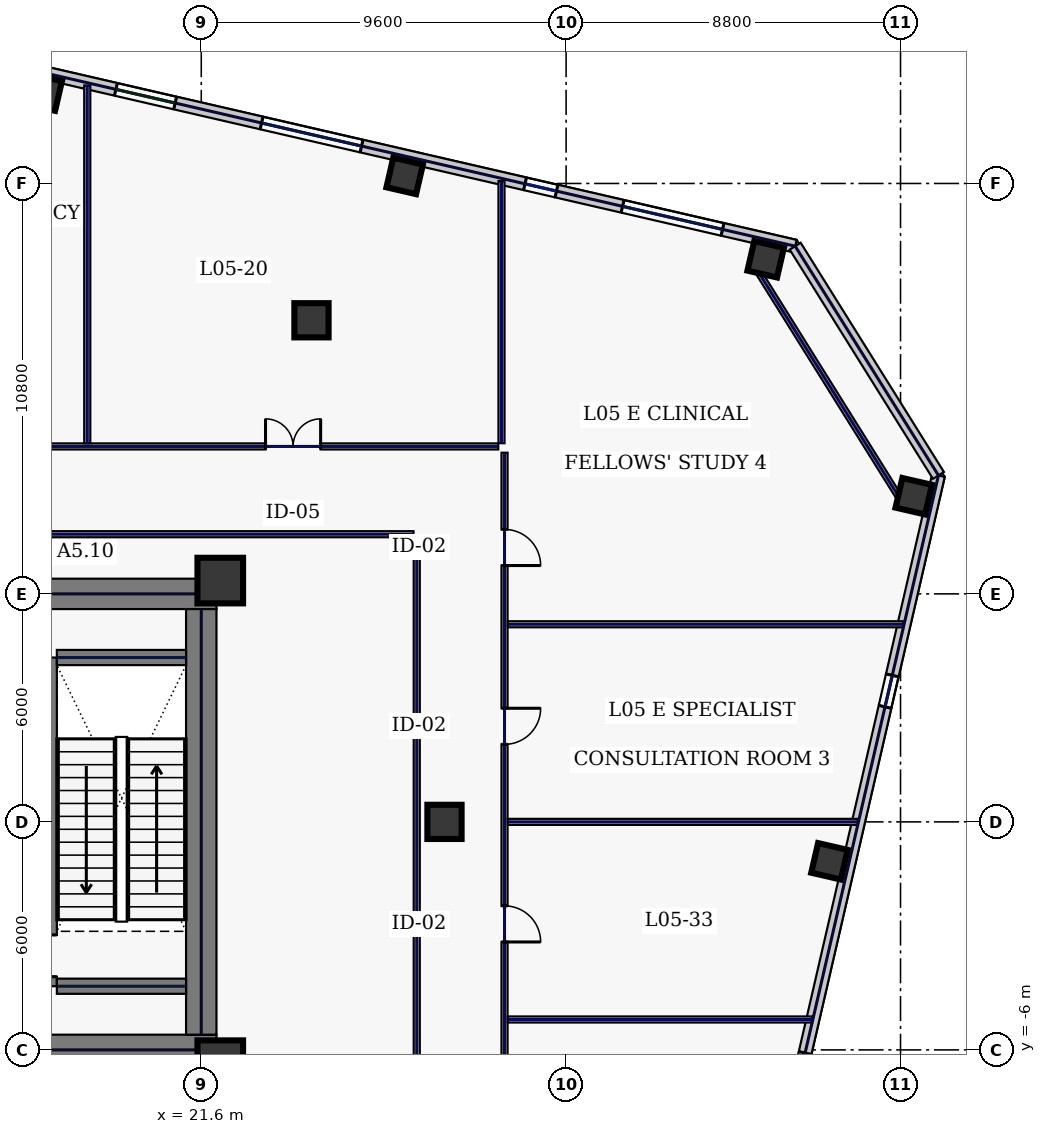
"""IFC4 building model, lengths in metres.
Left out: names, types, materials, properties, quantities, classifications, styles, units other than length and angle.
Written with IfcOpenShell. Run it as: python <this file> out.ifc"""

import sys

from ifc_helpers import new_model, si_unit, direction, frame, frame_2d, origin, origin_2d, place, context, subcontext, project, spatial, rectangle, hollow_rectangle, extrude, element, fill, save


model = new_model("IFC4")
c1 = context("Model", 3, precision=1e-05, world=origin(), true_north=direction((0.0, 1.0)))
c2 = subcontext(c1, "Body", "Model", "MODEL_VIEW")
j1 = project(units=[si_unit("LENGTHUNIT", "METRE"), si_unit("PLANEANGLEUNIT", "RADIAN")], contexts=[c1])
p1 = place(None, origin())
s1 = spatial("IfcSite", under=j1, at=p1, CompositionType="ELEMENT")
p2 = place(p1, origin())
s2 = spatial("IfcBuilding", under=s1, at=p2, CompositionType="ELEMENT")
p3 = place(p2, frame((0.0, 0.0, 28.4)))
s3 = spatial("IfcBuildingStorey", under=s2, at=p3, CompositionType="ELEMENT", Elevation=28.4)
for number, where, z_axis, x_axis in (
    (1, (10.4, 6.0, 0.0), (0.0, 0.0, 1.0), (1.0, 0.0, 0.0)),
    (2, (10.4, -6.0, 0.0), (0.0, 0.0, 1.0), (1.0, 0.0, 0.0)),
):
    element("IfcWall", number, at=place(p3, frame(where, z_axis=z_axis, x_axis=x_axis)), inside=s3, PredefinedType="SHEAR", context=c2, shape_type="SweptSolid", body=[
        extrude(rectangle(XDim=11.6, YDim=0.8, at=frame_2d((5.8, 0.0))), origin(), (0.0, 0.0, 1.0), 4.68),
    ])
p4 = place(p3, frame((21.6, -5.6, 0.0), z_axis=(0.0, 0.0, 1.0), x_axis=(0.0, 1.0, 0.0)))
e3 = element("IfcWall", 3, at=p4, inside=s3, PredefinedType="SHEAR", context=c2, shape_type="SweptSolid", body=[
    extrude(rectangle(XDim=11.2, YDim=0.8, at=frame_2d((5.6, 0.0))), origin(), (0.0, 0.0, 1.0), 4.68),
])
p5 = place(p3, frame((17.6, -4.325, 0.0), z_axis=(0.0, 0.0, 1.0), x_axis=(0.0, 1.0, 0.0)))
e4 = element("IfcWall", 4, at=p5, inside=s3, PredefinedType="SHEAR", context=c2, shape_type="SweptSolid", body=[
    extrude(rectangle(XDim=8.65, YDim=0.4, at=frame_2d((4.325, 0.0))), origin(), (0.0, 0.0, 1.0), 4.68),
])
p6 = place(p5, frame((0.25, 0.0, 0.0)))
e5 = element("IfcOpeningElement", 5, at=p6, cuts=e4, PredefinedType="OPENING", context=c2, shape_type="SweptSolid", body=[
    extrude(rectangle(XDim=1.1, YDim=2.2, at=frame_2d((0.55, 1.1))), frame((0.0, 0.21, 0.0), z_axis=(0.0, -1.0, 0.0), x_axis=(1.0, 0.0, 0.0)), (0.0, 0.0, 1.0), 0.42),
])
for number, where, z_axis, x_axis in (
    (6, (17.8, -4.325, 0.0), (0.0, 0.0, 1.0), (1.0, 0.0, 0.0)),
    (7, (17.8, 4.325, 0.0), (0.0, 0.0, 1.0), (1.0, 0.0, 0.0)),
):
    element("IfcWall", number, at=place(p3, frame(where, z_axis=z_axis, x_axis=x_axis)), inside=s3, PredefinedType="SHEAR", context=c2, shape_type="SweptSolid", body=[
        extrude(rectangle(XDim=3.4, YDim=0.4, at=frame_2d((1.7, 0.0))), origin(), (0.0, 0.0, 1.0), 4.68),
    ])
for number, where, z_axis, x_axis in (
    (8, (22.1, -6.35, 0.0), (0.0, 0.0, 1.0), (1.0, 0.0, 0.0)),
    (9, (22.1, 6.35, 0.0), (0.0, 0.0, 1.0), (1.0, 0.0, 0.0)),
):
    element("IfcColumn", number, at=place(p3, frame(where, z_axis=z_axis, x_axis=x_axis)), inside=s3, PredefinedType="COLUMN", context=c2, shape_type="SweptSolid", body=[
        extrude(hollow_rectangle(XDim=1.2, YDim=1.2, WallThickness=0.05, at=origin_2d()), origin(), (0.0, 0.0, 1.0), 4.68),
    ])
for number, where, z_axis, x_axis in (
    (10, (24.5, 13.2, 0.0), (0.0, 0.0, 1.0), (1.0, 0.0, 0.0)),
    (11, (28.0, 0.0, 0.0), (0.0, 0.0, 1.0), (1.0, 0.0, 0.0)),
):
    element("IfcColumn", number, at=place(p3, frame(where, z_axis=z_axis, x_axis=x_axis)), inside=s3, PredefinedType="COLUMN", context=c2, shape_type="SweptSolid", body=[
        extrude(hollow_rectangle(XDim=0.9, YDim=0.9, WallThickness=0.04, at=origin_2d()), origin(), (0.0, 0.0, 1.0), 4.68),
    ])
for number, where, z_axis, x_axis in (
    (12, (36.451, 14.806, 0.0), (0.0, 0.0, 1.0), (0.974, -0.225, 0.0)),
    (13, (26.952, 16.999, 0.0), (0.0, 0.0, 1.0), (0.974, -0.225, 0.0)),
    (14, (17.454, 19.192, 0.0), (0.0, 0.0, 1.0), (0.974, -0.225, 0.0)),
    (15, (38.13, -1.038, 0.0), (0.0, 0.0, 1.0), (0.974, -0.225, 0.0)),
    (16, (40.348, 8.57, 0.0), (0.0, 0.0, 1.0), (0.974, -0.225, 0.0)),
):
    element("IfcColumn", number, at=place(p3, frame(where, z_axis=z_axis, x_axis=x_axis)), inside=s3, PredefinedType="COLUMN", context=c2, shape_type="SweptSolid", body=[
        extrude(hollow_rectangle(XDim=0.8, YDim=0.8, WallThickness=0.036, at=origin_2d()), origin(), (0.0, 0.0, 1.0), 4.68),
    ])
p7 = place(p3, frame((37.229, 15.15, 0.0), z_axis=(0.0, 0.0, 1.0), x_axis=(-0.97436993772, 0.224951604723, 0.0)))
e17 = element("IfcWall", 17, at=p7, inside=s3, PredefinedType="STANDARD", context=c2, shape_type="SweptSolid", body=[
    extrude(rectangle(XDim=22.651, YDim=0.34, at=frame_2d((11.326, 0.0))), origin(), (0.0, 0.0, 1.0), 4.68),
])
p8 = place(p7, frame((16.745, 0.0, 0.22)))
e18 = element("IfcOpeningElement", 18, at=p8, cuts=e17, PredefinedType="OPENING", context=c2, shape_type="SweptSolid", body=[
    extrude(rectangle(XDim=1.6, YDim=1.2, at=frame_2d((0.8, 0.6))), frame((0.0, 0.18, 0.0), z_axis=(0.0, -1.0, 0.0), x_axis=(1.0, 0.0, 0.0)), (0.0, 0.0, 1.0), 0.36),
])
p9 = place(p7, frame((11.711, 0.0, 0.9)))
e19 = element("IfcOpeningElement", 19, at=p9, cuts=e17, PredefinedType="OPENING", context=c2, shape_type="SweptSolid", body=[
    extrude(rectangle(XDim=2.7, YDim=2.2, at=frame_2d((1.35, 1.1))), frame((0.0, 0.18, 0.0), z_axis=(0.0, -1.0, 0.0), x_axis=(1.0, 0.0, 0.0)), (0.0, 0.0, 1.0), 0.36),
])
p10 = place(p7, frame((6.447, 0.0, 0.9)))
e20 = element("IfcOpeningElement", 20, at=p10, cuts=e17, PredefinedType="OPENING", context=c2, shape_type="SweptSolid", body=[
    extrude(rectangle(XDim=0.85, YDim=1.85, at=frame_2d((0.425, 0.925))), frame((0.0, 0.18, 0.0), z_axis=(0.0, -1.0, 0.0), x_axis=(1.0, 0.0, 0.0)), (0.0, 0.0, 1.0), 0.36),
])
p11 = place(p7, frame((1.962, 0.0, 0.9)))
e21 = element("IfcOpeningElement", 21, at=p11, cuts=e17, PredefinedType="OPENING", context=c2, shape_type="SweptSolid", body=[
    extrude(rectangle(XDim=2.7, YDim=2.2, at=frame_2d((1.35, 1.1))), frame((0.0, 0.18, 0.0), z_axis=(0.0, -1.0, 0.0), x_axis=(1.0, 0.0, 0.0)), (0.0, 0.0, 1.0), 0.36),
])
p12 = place(p3, frame((31.82, -30.637, 0.0), z_axis=(0.0, 0.0, 1.0), x_axis=(0.224949969076, 0.974370315338, 0.0)))
e22 = element("IfcWall", 22, at=p12, inside=s3, PredefinedType="STANDARD", context=c2, shape_type="SweptSolid", body=[
    extrude(rectangle(XDim=40.8, YDim=0.34, at=frame_2d((20.4, 0.0))), origin(), (0.0, 0.0, 1.0), 4.68),
])
p13 = place(p12, frame((4.3, 0.0, 0.58)))
e23 = element("IfcOpeningElement", 23, at=p13, cuts=e22, PredefinedType="OPENING", context=c2, shape_type="SweptSolid", body=[
    extrude(rectangle(XDim=1.6, YDim=2.3, at=frame_2d((0.8, 1.15))), frame((0.0, 0.18, 0.0), z_axis=(0.0, -1.0, 0.0), x_axis=(1.0, 0.0, 0.0)), (0.0, 0.0, 1.0), 0.36),
])
p14 = place(p12, frame((14.5, 0.0, 0.58)))
e24 = element("IfcOpeningElement", 24, at=p14, cuts=e22, PredefinedType="OPENING", context=c2, shape_type="SweptSolid", body=[
    extrude(rectangle(XDim=1.6, YDim=2.3, at=frame_2d((0.8, 1.15))), frame((0.0, 0.18, 0.0), z_axis=(0.0, -1.0, 0.0), x_axis=(1.0, 0.0, 0.0)), (0.0, 0.0, 1.0), 0.36),
])
p15 = place(p12, frame((24.35, 0.0, 0.75)))
e25 = element("IfcOpeningElement", 25, at=p15, cuts=e22, PredefinedType="OPENING", context=c2, shape_type="SweptSolid", body=[
    extrude(rectangle(XDim=0.85, YDim=1.85, at=frame_2d((0.425, 0.925))), frame((0.0, 0.18, 0.0), z_axis=(0.0, -1.0, 0.0), x_axis=(1.0, 0.0, 0.0)), (0.0, 0.0, 1.0), 0.36),
])
p16 = place(p12, frame((34.55, 0.0, 0.75)))
e26 = element("IfcOpeningElement", 26, at=p16, cuts=e22, PredefinedType="OPENING", context=c2, shape_type="SweptSolid", body=[
    extrude(rectangle(XDim=0.85, YDim=1.85, at=frame_2d((0.425, 0.925))), frame((0.0, 0.18, 0.0), z_axis=(0.0, -1.0, 0.0), x_axis=(1.0, 0.0, 0.0)), (0.0, 0.0, 1.0), 0.36),
])
p17 = place(p3, frame((40.998, 9.117, 0.0), z_axis=(0.0, 0.0, 1.0), x_axis=(-0.529921811158, 0.848046504656, 0.0)))
e27 = element("IfcWall", 27, at=p17, inside=s3, PredefinedType="STANDARD", context=c2, shape_type="SweptSolid", body=[
    extrude(rectangle(XDim=7.113, YDim=0.34, at=frame_2d((3.557, 0.0))), origin(), (0.0, 0.0, 1.0), 4.68),
])
p18 = place(p3, frame((40.06, 8.389, 0.0), z_axis=(0.0, 0.0, 1.0), x_axis=(-0.529927317139, 0.848043064089, 0.0)))
e28 = element("IfcWall", 28, at=p18, inside=s3, PredefinedType="PARTITIONING", context=c2, shape_type="SweptSolid", body=[
    extrude(rectangle(XDim=7.354, YDim=0.16, at=frame_2d((3.677, 0.0))), origin(), (0.0, 0.0, 1.0), 4.68),
])
p19 = place(p3, frame((-29.415, 9.88, 0.0), z_axis=(0.0, 0.0, 1.0), x_axis=(1.0, 0.0, 0.0)))
e29 = element("IfcWall", 29, at=p19, inside=s3, PredefinedType="PARTITIONING", context=c2, shape_type="SweptSolid", body=[
    extrude(rectangle(XDim=58.83, YDim=0.16, at=frame_2d((29.415, 0.0))), origin(), (0.0, 0.0, 1.0), 4.68),
])
p20 = place(p19, frame((2.469, 0.0, 0.0)))
e30 = element("IfcOpeningElement", 30, at=p20, cuts=e29, PredefinedType="OPENING", context=c2, shape_type="SweptSolid", body=[
    extrude(rectangle(XDim=0.95, YDim=2.2, at=frame_2d((0.475, 1.1))), frame((0.0, 0.09, 0.0), z_axis=(0.0, -1.0, 0.0), x_axis=(1.0, 0.0, 0.0)), (0.0, 0.0, 1.0), 0.18),
])
p21 = place(p19, frame((7.15, 0.0, 0.0)))
e31 = element("IfcOpeningElement", 31, at=p21, cuts=e29, PredefinedType="OPENING", context=c2, shape_type="SweptSolid", body=[
    extrude(rectangle(XDim=1.3, YDim=2.2, at=frame_2d((0.65, 1.1))), frame((0.0, 0.09, 0.0), z_axis=(0.0, -1.0, 0.0), x_axis=(1.0, 0.0, 0.0)), (0.0, 0.0, 1.0), 0.18),
])
p22 = place(p19, frame((14.325, 0.0, 0.0)))
e32 = element("IfcOpeningElement", 32, at=p22, cuts=e29, PredefinedType="OPENING", context=c2, shape_type="SweptSolid", body=[
    extrude(rectangle(XDim=1.3, YDim=2.2, at=frame_2d((0.65, 1.1))), frame((0.0, 0.09, 0.0), z_axis=(0.0, -1.0, 0.0), x_axis=(1.0, 0.0, 0.0)), (0.0, 0.0, 1.0), 0.18),
])
p23 = place(p19, frame((23.8, 0.0, 0.0)))
e33 = element("IfcOpeningElement", 33, at=p23, cuts=e29, PredefinedType="OPENING", context=c2, shape_type="SweptSolid", body=[
    extrude(rectangle(XDim=1.15, YDim=2.2, at=frame_2d((0.575, 1.1))), frame((0.0, 0.09, 0.0), z_axis=(0.0, -1.0, 0.0), x_axis=(1.0, 0.0, 0.0)), (0.0, 0.0, 1.0), 0.18),
])
p24 = place(p19, frame((33.125, 0.0, 0.0)))
e34 = element("IfcOpeningElement", 34, at=p24, cuts=e29, PredefinedType="OPENING", context=c2, shape_type="SweptSolid", body=[
    extrude(rectangle(XDim=1.3, YDim=2.2, at=frame_2d((0.65, 1.1))), frame((0.0, 0.09, 0.0), z_axis=(0.0, -1.0, 0.0), x_axis=(1.0, 0.0, 0.0)), (0.0, 0.0, 1.0), 0.18),
])
p25 = place(p19, frame((42.825, 0.0, 0.0)))
e35 = element("IfcOpeningElement", 35, at=p25, cuts=e29, PredefinedType="OPENING", context=c2, shape_type="SweptSolid", body=[
    extrude(rectangle(XDim=1.3, YDim=2.2, at=frame_2d((0.65, 1.1))), frame((0.0, 0.09, 0.0), z_axis=(0.0, -1.0, 0.0), x_axis=(1.0, 0.0, 0.0)), (0.0, 0.0, 1.0), 0.18),
])
p26 = place(p19, frame((52.706, 0.0, 0.0)))
e36 = element("IfcOpeningElement", 36, at=p26, cuts=e29, PredefinedType="OPENING", context=c2, shape_type="SweptSolid", body=[
    extrude(rectangle(XDim=1.45, YDim=2.2, at=frame_2d((0.725, 1.1))), frame((0.0, 0.09, 0.0), z_axis=(0.0, -1.0, 0.0), x_axis=(1.0, 0.0, 0.0)), (0.0, 0.0, 1.0), 0.18),
])
p27 = place(p3, frame((29.58, 9.715, 0.0), z_axis=(0.0, 0.0, 1.0), x_axis=(0.0, -1.0, 0.0)))
e37 = element("IfcWall", 37, at=p27, inside=s3, PredefinedType="PARTITIONING", context=c2, shape_type="SweptSolid", body=[
    extrude(rectangle(XDim=19.43, YDim=0.16, at=frame_2d((9.715, 0.0))), origin(), (0.0, 0.0, 1.0), 4.68),
])
p28 = place(p27, frame((16.631, 0.0, 0.0)))
e38 = element("IfcOpeningElement", 38, at=p28, cuts=e37, PredefinedType="OPENING", context=c2, shape_type="SweptSolid", body=[
    extrude(rectangle(XDim=0.95, YDim=2.2, at=frame_2d((0.475, 1.1))), frame((0.0, 0.09, 0.0), z_axis=(0.0, -1.0, 0.0), x_axis=(1.0, 0.0, 0.0)), (0.0, 0.0, 1.0), 0.18),
])
p29 = place(p27, frame((11.925, 0.0, 0.0)))
e39 = element("IfcOpeningElement", 39, at=p29, cuts=e37, PredefinedType="OPENING", context=c2, shape_type="SweptSolid", body=[
    extrude(rectangle(XDim=0.95, YDim=2.2, at=frame_2d((0.475, 1.1))), frame((0.0, 0.09, 0.0), z_axis=(0.0, -1.0, 0.0), x_axis=(1.0, 0.0, 0.0)), (0.0, 0.0, 1.0), 0.18),
])
p30 = place(p27, frame((6.725, 0.0, 0.0)))
e40 = element("IfcOpeningElement", 40, at=p30, cuts=e37, PredefinedType="OPENING", context=c2, shape_type="SweptSolid", body=[
    extrude(rectangle(XDim=0.95, YDim=2.2, at=frame_2d((0.475, 1.1))), frame((0.0, 0.09, 0.0), z_axis=(0.0, -1.0, 0.0), x_axis=(1.0, 0.0, 0.0)), (0.0, 0.0, 1.0), 0.18),
])
p31 = place(p27, frame((2.019, 0.0, 0.0)))
e41 = element("IfcOpeningElement", 41, at=p31, cuts=e37, PredefinedType="OPENING", context=c2, shape_type="SweptSolid", body=[
    extrude(rectangle(XDim=0.95, YDim=2.2, at=frame_2d((0.475, 1.1))), frame((0.0, 0.09, 0.0), z_axis=(0.0, -1.0, 0.0), x_axis=(1.0, 0.0, 0.0)), (0.0, 0.0, 1.0), 0.18),
])
p32 = place(p3, frame((27.185, 7.57, 0.0), z_axis=(0.0, 0.0, 1.0), x_axis=(-1.0, 0.0, 0.0)))
e42 = element("IfcWall", 42, at=p32, inside=s3, PredefinedType="PARTITIONING", context=c2, shape_type="SweptSolid", body=[
    extrude(rectangle(XDim=16.52, YDim=0.16, at=frame_2d((8.26, 0.0))), origin(), (0.0, 0.0, 1.0), 4.68),
])
p33 = place(p3, frame((27.27, -7.485, 0.0), z_axis=(0.0, 0.0, 1.0), x_axis=(0.0, 1.0, 0.0)))
e43 = element("IfcWall", 43, at=p33, inside=s3, PredefinedType="PARTITIONING", context=c2, shape_type="SweptSolid", body=[
    extrude(rectangle(XDim=14.97, YDim=0.16, at=frame_2d((7.485, 0.0))), origin(), (0.0, 0.0, 1.0), 4.68),
])
p34 = place(p3, frame((29.5, 9.965, 0.0), z_axis=(0.0, 0.0, 1.0), x_axis=(0.0, 1.0, 0.0)))
e44 = element("IfcWall", 44, at=p34, inside=s3, PredefinedType="PARTITIONING", context=c2, shape_type="SweptSolid", body=[
    extrude(rectangle(XDim=6.897, YDim=0.16, at=frame_2d((3.449, 0.0))), origin(), (0.0, 0.0, 1.0), 4.68),
])
p35 = place(p3, frame((18.6, 9.965, 0.0), z_axis=(0.0, 0.0, 1.0), x_axis=(0.0, 1.0, 0.0)))
e45 = element("IfcWall", 45, at=p35, inside=s3, PredefinedType="PARTITIONING", context=c2, shape_type="SweptSolid", body=[
    extrude(rectangle(XDim=9.414, YDim=0.16, at=frame_2d((4.707, 0.0))), origin(), (0.0, 0.0, 1.0), 4.68),
])
p36 = place(p3, frame((29.665, -5.2, 0.0), z_axis=(0.0, 0.0, 1.0), x_axis=(1.0, 0.0, 0.0)))
e46 = element("IfcWall", 46, at=p36, inside=s3, PredefinedType="PARTITIONING", context=c2, shape_type="SweptSolid", body=[
    extrude(rectangle(XDim=8.007, YDim=0.16, at=frame_2d((4.003, 0.0))), origin(), (0.0, 0.0, 1.0), 4.68),
])
p37 = place(p3, frame((29.665, 0.0, 0.0), z_axis=(0.0, 0.0, 1.0), x_axis=(1.0, 0.0, 0.0)))
e47 = element("IfcWall", 47, at=p37, inside=s3, PredefinedType="PARTITIONING", context=c2, shape_type="SweptSolid", body=[
    extrude(rectangle(XDim=9.208, YDim=0.16, at=frame_2d((4.604, 0.0))), origin(), (0.0, 0.0, 1.0), 4.175),
])
p38 = place(p3, frame((29.665, 5.2, 0.0), z_axis=(0.0, 0.0, 1.0), x_axis=(1.0, 0.0, 0.0)))
e48 = element("IfcWall", 48, at=p38, inside=s3, PredefinedType="PARTITIONING", context=c2, shape_type="SweptSolid", body=[
    extrude(rectangle(XDim=10.408, YDim=0.16, at=frame_2d((5.204, 0.0))), origin(), (0.0, 0.0, 1.0), 4.68),
])
p39 = place(p8, origin())
e49 = element("IfcWindow", 49, at=p39, inside=s3, PartitioningType="SINGLE_PANEL", PredefinedType="WINDOW", context=c2, shape_type="SweptSolid", body=[
    extrude(rectangle(XDim=1.6, YDim=1.2, at=frame_2d((0.8, 0.6))), frame((0.0, 0.03, 0.0), z_axis=(0.0, -1.0, 0.0), x_axis=(1.0, 0.0, 0.0)), (0.0, 0.0, 1.0), 0.06),
])
fill(e18, e49)
p40 = place(p9, origin())
e50 = element("IfcWindow", 50, at=p40, inside=s3, PartitioningType="SINGLE_PANEL", PredefinedType="WINDOW", context=c2, shape_type="SweptSolid", body=[
    extrude(rectangle(XDim=2.7, YDim=2.2, at=frame_2d((1.35, 1.1))), frame((0.0, 0.03, 0.0), z_axis=(0.0, -1.0, 0.0), x_axis=(1.0, 0.0, 0.0)), (0.0, 0.0, 1.0), 0.06),
])
fill(e19, e50)
p41 = place(p10, origin())
e51 = element("IfcWindow", 51, at=p41, inside=s3, PartitioningType="SINGLE_PANEL", PredefinedType="WINDOW", context=c2, shape_type="SweptSolid", body=[
    extrude(rectangle(XDim=0.85, YDim=1.85, at=frame_2d((0.425, 0.925))), frame((0.0, 0.03, 0.0), z_axis=(0.0, -1.0, 0.0), x_axis=(1.0, 0.0, 0.0)), (0.0, 0.0, 1.0), 0.06),
])
fill(e20, e51)
p42 = place(p11, origin())
e52 = element("IfcWindow", 52, at=p42, inside=s3, PartitioningType="SINGLE_PANEL", PredefinedType="WINDOW", context=c2, shape_type="SweptSolid", body=[
    extrude(rectangle(XDim=2.7, YDim=2.2, at=frame_2d((1.35, 1.1))), frame((0.0, 0.03, 0.0), z_axis=(0.0, -1.0, 0.0), x_axis=(1.0, 0.0, 0.0)), (0.0, 0.0, 1.0), 0.06),
])
fill(e21, e52)
p43 = place(p15, origin())
e53 = element("IfcWindow", 53, at=p43, inside=s3, PartitioningType="SINGLE_PANEL", PredefinedType="WINDOW", context=c2, shape_type="SweptSolid", body=[
    extrude(rectangle(XDim=0.85, YDim=1.85, at=frame_2d((0.425, 0.925))), frame((0.0, 0.03, 0.0), z_axis=(0.0, -1.0, 0.0), x_axis=(1.0, 0.0, 0.0)), (0.0, 0.0, 1.0), 0.06),
])
fill(e25, e53)
p44 = place(p16, origin())
e54 = element("IfcWindow", 54, at=p44, inside=s3, PartitioningType="SINGLE_PANEL", PredefinedType="WINDOW", context=c2, shape_type="SweptSolid", body=[
    extrude(rectangle(XDim=0.85, YDim=1.85, at=frame_2d((0.425, 0.925))), frame((0.0, 0.03, 0.0), z_axis=(0.0, -1.0, 0.0), x_axis=(1.0, 0.0, 0.0)), (0.0, 0.0, 1.0), 0.06),
])
fill(e26, e54)
p45 = place(p26, origin())
e55 = element("IfcDoor", 55, at=p45, inside=s3, OperationType="DOUBLE_SWING_LEFT", PredefinedType="DOOR", context=c2, shape_type="SweptSolid", body=[
    extrude(rectangle(XDim=1.45, YDim=2.2, at=frame_2d((0.725, 1.1))), frame((0.0, 0.025, 0.0), z_axis=(0.0, -1.0, 0.0), x_axis=(1.0, 0.0, 0.0)), (0.0, 0.0, 1.0), 0.05),
])
fill(e36, e55)
p46 = place(p29, origin())
e56 = element("IfcDoor", 56, at=p46, inside=s3, OperationType="SINGLE_SWING_RIGHT", PredefinedType="DOOR", context=c2, shape_type="SweptSolid", body=[
    extrude(rectangle(XDim=0.95, YDim=2.2, at=frame_2d((0.475, 1.1))), frame((0.0, 0.025, 0.0), z_axis=(0.0, -1.0, 0.0), x_axis=(1.0, 0.0, 0.0)), (0.0, 0.0, 1.0), 0.05),
])
fill(e39, e56)
p47 = place(p30, origin())
e57 = element("IfcDoor", 57, at=p47, inside=s3, OperationType="SINGLE_SWING_LEFT", PredefinedType="DOOR", context=c2, shape_type="SweptSolid", body=[
    extrude(rectangle(XDim=0.95, YDim=2.2, at=frame_2d((0.475, 1.1))), frame((0.0, 0.025, 0.0), z_axis=(0.0, -1.0, 0.0), x_axis=(1.0, 0.0, 0.0)), (0.0, 0.0, 1.0), 0.05),
])
fill(e40, e57)
p48 = place(p31, origin())
e58 = element("IfcDoor", 58, at=p48, inside=s3, OperationType="SINGLE_SWING_RIGHT", PredefinedType="DOOR", context=c2, shape_type="SweptSolid", body=[
    extrude(rectangle(XDim=0.95, YDim=2.2, at=frame_2d((0.475, 1.1))), frame((0.0, 0.025, 0.0), z_axis=(0.0, -1.0, 0.0), x_axis=(1.0, 0.0, 0.0)), (0.0, 0.0, 1.0), 0.05),
])
fill(e41, e58)
save(model, sys.argv[1])
